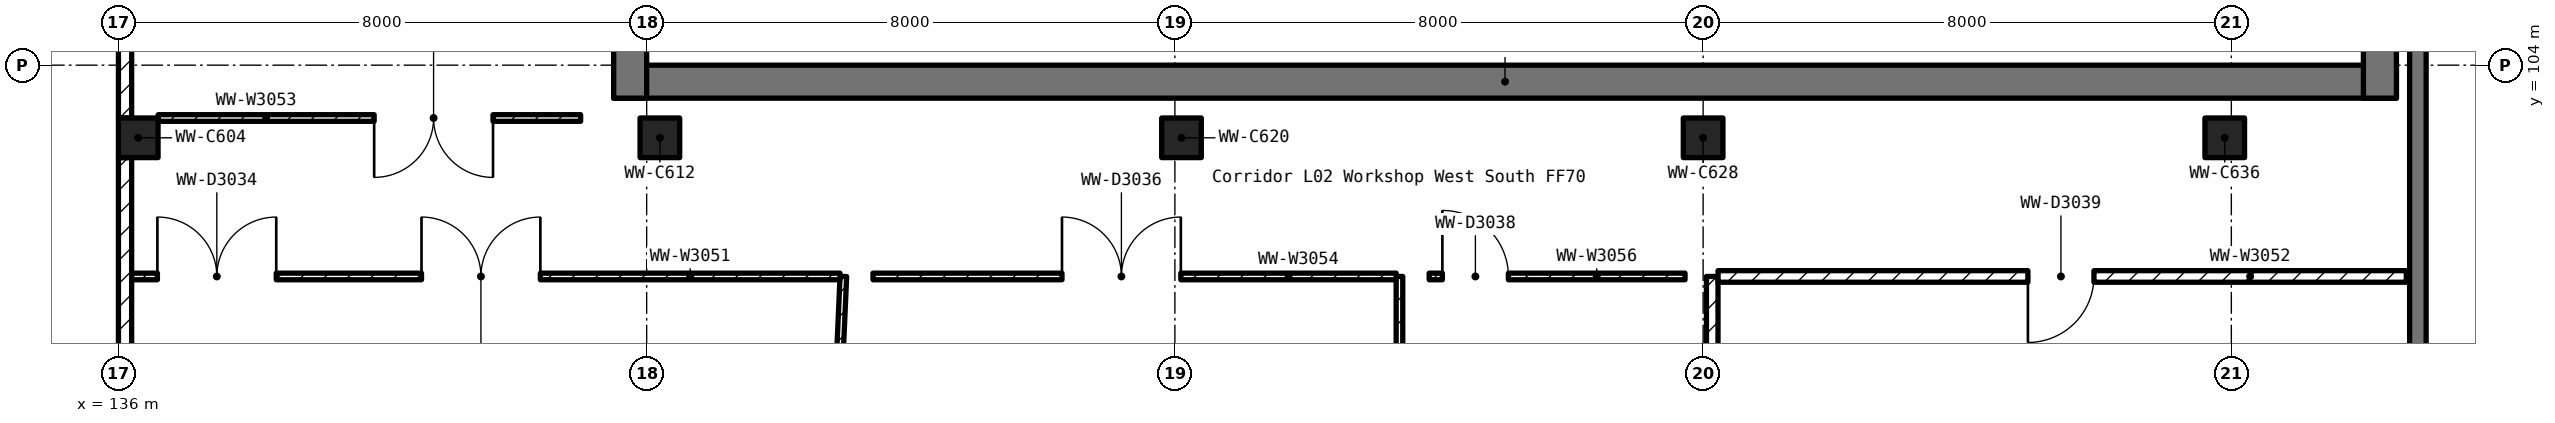
"""IFC4 building model, lengths in metres.
Left out: names, types, materials, properties, quantities, classifications, styles, units other than length and angle.
Written with IfcOpenShell. Run it as: python <this file> out.ifc"""

import sys

from ifc_helpers import new_model, si_unit, direction, frame, frame_2d, origin, origin_2d, place, context, subcontext, project, spatial, rectangle, extrude, element, fill, save


model = new_model("IFC4")
c1 = context("Model", 3, precision=1e-05, world=origin(), true_north=direction((0.0, 1.0)))
c2 = subcontext(c1, "Body", "Model", "MODEL_VIEW")
j1 = project(units=[si_unit("LENGTHUNIT", "METRE"), si_unit("PLANEANGLEUNIT", "RADIAN")], contexts=[c1])
p1 = place(None, origin())
s1 = spatial("IfcSite", under=j1, at=p1, CompositionType="ELEMENT")
p2 = place(p1, origin())
s2 = spatial("IfcBuilding", under=s1, at=p2, CompositionType="ELEMENT")
p3 = place(p2, frame((0.0, 0.0, 11.5)))
s3 = spatial("IfcBuildingStorey", under=s2, at=p3, CompositionType="ELEMENT", Elevation=11.5)
for number, where, z_axis, x_axis in (
    (1, (136.3, 102.9, 0.0), (0.0, 0.0, 1.0), (1.0, 0.0, 0.0)),
    (2, (144.2, 102.9, 0.0), (0.0, 0.0, 1.0), (1.0, 0.0, 0.0)),
    (3, (152.1, 102.9, 0.0), (0.0, 0.0, 1.0), (1.0, 0.0, 0.0)),
    (4, (160.0, 102.9, 0.0), (0.0, 0.0, 1.0), (1.0, 0.0, 0.0)),
    (5, (167.9, 102.9, 0.0), (0.0, 0.0, 1.0), (1.0, 0.0, 0.0)),
):
    element("IfcColumn", number, at=place(p3, frame(where, z_axis=z_axis, x_axis=x_axis)), inside=s3, PredefinedType="COLUMN", context=c2, shape_type="SweptSolid", body=[
        extrude(rectangle(XDim=0.6, YDim=0.6, at=origin_2d()), origin(), (0.0, 0.0, 1.0), 5.5),
    ])
p4 = place(p3, frame((143.5, 103.75, 0.0), z_axis=(0.0, 0.0, 1.0), x_axis=(1.0, 0.0, 0.0)))
e6 = element("IfcWall", 6, at=p4, inside=s3, PredefinedType="SHEAR", context=c2, shape_type="SweptSolid", body=[
    extrude(rectangle(XDim=27.0, YDim=0.5, at=frame_2d((13.5, 0.0))), origin(), (0.0, 0.0, 1.0), 5.5),
])
for number, where, z_axis, x_axis in (
    (7, (143.75, 103.5, 0.0), (0.0, 0.0, 1.0), (0.0, 1.0, 0.0)),
    (8, (170.25, 103.5, 0.0), (0.0, 0.0, 1.0), (0.0, 1.0, 0.0)),
):
    element("IfcWall", number, at=place(p3, frame(where, z_axis=z_axis, x_axis=x_axis)), inside=s3, PredefinedType="SHEAR", context=c2, shape_type="SweptSolid", body=[
        extrude(rectangle(XDim=25.0, YDim=0.5, at=frame_2d((12.5, 0.0))), origin(), (0.0, 0.0, 1.0), 5.5),
    ])
p5 = place(p3, frame((136.1, 106.9, 0.0), z_axis=(0.0, 0.0, 1.0), x_axis=(0.0, -1.0, 0.0)))
e9 = element("IfcWall", 9, at=p5, inside=s3, PredefinedType="SOLIDWALL", context=c2, shape_type="SweptSolid", body=[
    extrude(rectangle(XDim=3.7, YDim=0.2, at=frame_2d((1.85, 0.0))), origin(), (0.0, 0.0, 1.0), 4.45),
])
p6 = place(p3, frame((136.1, 102.6, 0.0), z_axis=(0.0, 0.0, 1.0), x_axis=(0.0, -1.0, 0.0)))
e10 = element("IfcWall", 10, at=p6, inside=s3, PredefinedType="SOLIDWALL", context=c2, shape_type="SweptSolid", body=[
    extrude(rectangle(XDim=2.925, YDim=0.2, at=frame_2d((1.462, 0.0))), origin(), (0.0, 0.0, 1.0), 4.45),
])
p7 = place(p3, frame((170.825, 105.6, 0.0), z_axis=(0.0, 0.0, 1.0), x_axis=(0.0, -1.0, 0.0)))
e11 = element("IfcWall", 11, at=p7, inside=s3, PredefinedType="SOLIDWALL", context=c2, shape_type="SweptSolid", body=[
    extrude(rectangle(XDim=6.6, YDim=0.25, at=frame_2d((3.3, 0.0))), origin(), (0.0, 0.0, 1.0), 5.5),
])
p8 = place(p3, frame((146.979, 100.8, 0.0), z_axis=(0.0, 0.0, 1.0), x_axis=(-0.044161260763, -0.999024415642, 0.0)))
e12 = element("IfcWall", 12, at=p8, inside=s3, PredefinedType="PARTITIONING", context=c2, shape_type="SweptSolid", body=[
    extrude(rectangle(XDim=22.622, YDim=0.1, at=frame_2d((11.311, 0.0))), origin(), (0.0, 0.0, 1.0), 4.45),
])
p9 = place(p3, frame((155.401, 100.8, 0.0), z_axis=(0.0, 0.0, 1.0), x_axis=(0.0, -1.0, 0.0)))
e13 = element("IfcWall", 13, at=p9, inside=s3, PredefinedType="PARTITIONING", context=c2, shape_type="SweptSolid", body=[
    extrude(rectangle(XDim=22.6, YDim=0.1, at=frame_2d((11.3, 0.0))), origin(), (0.0, 0.0, 1.0), 4.45),
])
p10 = place(p3, frame((160.138, 100.8, 0.0), z_axis=(0.0, 0.0, 1.0), x_axis=(0.0, -1.0, 0.0)))
e14 = element("IfcWall", 14, at=p10, inside=s3, PredefinedType="PARTITIONING", context=c2, shape_type="SweptSolid", body=[
    extrude(rectangle(XDim=5.799, YDim=0.175, at=frame_2d((2.899, 0.0))), origin(), (0.0, 0.0, 1.0), 4.45),
])
p11 = place(p3, frame((136.2, 100.8, 0.0), z_axis=(0.0, 0.0, 1.0), x_axis=(1.0, 0.0, 0.0)))
e15 = element("IfcWall", 15, at=p11, inside=s3, PredefinedType="PARTITIONING", context=c2, shape_type="SweptSolid", body=[
    extrude(rectangle(XDim=10.728, YDim=0.1, at=frame_2d((5.364, 0.0))), origin(), (0.0, 0.0, 1.0), 4.45),
])
p12 = place(p11, frame((4.39, 0.0, 0.0)))
e16 = element("IfcOpeningElement", 16, at=p12, cuts=e15, PredefinedType="OPENING", context=c2, shape_type="SweptSolid", body=[
    extrude(rectangle(XDim=1.8, YDim=2.1, at=frame_2d((0.9, 1.05))), frame((0.0, 0.062, 0.0), z_axis=(0.0, -1.0, 0.0), x_axis=(1.0, 0.0, 0.0)), (0.0, 0.0, 1.0), 0.124),
])
p13 = place(p11, frame((0.39, 0.0, 0.0)))
e17 = element("IfcOpeningElement", 17, at=p13, cuts=e15, PredefinedType="OPENING", context=c2, shape_type="SweptSolid", body=[
    extrude(rectangle(XDim=1.8, YDim=2.1, at=frame_2d((0.9, 1.05))), frame((0.0, 0.062, 0.0), z_axis=(0.0, -1.0, 0.0), x_axis=(1.0, 0.0, 0.0)), (0.0, 0.0, 1.0), 0.124),
])
p14 = place(p3, frame((170.65, 100.8, 0.0), z_axis=(0.0, 0.0, 1.0), x_axis=(-1.0, 0.0, 0.0)))
e18 = element("IfcWall", 18, at=p14, inside=s3, PredefinedType="PARTITIONING", context=c2, shape_type="SweptSolid", body=[
    extrude(rectangle(XDim=10.424, YDim=0.175, at=frame_2d((5.212, 0.0))), origin(), (0.0, 0.0, 1.0), 4.45),
])
p15 = place(p14, frame((4.731, 0.0, 0.0)))
e19 = element("IfcOpeningElement", 19, at=p15, cuts=e18, PredefinedType="OPENING", context=c2, shape_type="SweptSolid", body=[
    extrude(rectangle(XDim=1.0, YDim=2.1, at=frame_2d((0.5, 1.05))), frame((0.0, 0.1, 0.0), z_axis=(0.0, -1.0, 0.0), x_axis=(1.0, 0.0, 0.0)), (0.0, 0.0, 1.0), 0.199),
])
p16 = place(p3, frame((143.0, 103.2, 0.0), z_axis=(0.0, 0.0, 1.0), x_axis=(-1.0, 0.0, 0.0)))
e20 = element("IfcWall", 20, at=p16, inside=s3, PredefinedType="PARTITIONING", context=c2, shape_type="SweptSolid", body=[
    extrude(rectangle(XDim=6.399, YDim=0.1, at=frame_2d((3.199, 0.0))), origin(), (0.0, 0.0, 1.0), 4.35),
])
p17 = place(p16, frame((1.327, 0.0, 0.0)))
e21 = element("IfcOpeningElement", 21, at=p17, cuts=e20, PredefinedType="OPENING", context=c2, shape_type="SweptSolid", body=[
    extrude(rectangle(XDim=1.8, YDim=2.1, at=frame_2d((0.9, 1.05))), frame((0.0, 0.062, 0.0), z_axis=(0.0, -1.0, 0.0), x_axis=(1.0, 0.0, 0.0)), (0.0, 0.0, 1.0), 0.124),
])
p18 = place(p3, frame((147.428, 100.8, 0.0), z_axis=(0.0, 0.0, 1.0), x_axis=(1.0, 0.0, 0.0)))
e22 = element("IfcWall", 22, at=p18, inside=s3, PredefinedType="PARTITIONING", context=c2, shape_type="SweptSolid", body=[
    extrude(rectangle(XDim=7.923, YDim=0.1, at=frame_2d((3.961, 0.0))), origin(), (0.0, 0.0, 1.0), 4.45),
])
p19 = place(p18, frame((2.862, 0.0, 0.0)))
e23 = element("IfcOpeningElement", 23, at=p19, cuts=e22, PredefinedType="OPENING", context=c2, shape_type="SweptSolid", body=[
    extrude(rectangle(XDim=1.8, YDim=2.1, at=frame_2d((0.9, 1.05))), frame((0.0, 0.062, 0.0), z_axis=(0.0, -1.0, 0.0), x_axis=(1.0, 0.0, 0.0)), (0.0, 0.0, 1.0), 0.124),
])
p20 = place(p3, frame((155.851, 100.8, 0.0), z_axis=(0.0, 0.0, 1.0), x_axis=(1.0, 0.0, 0.0)))
e24 = element("IfcWall", 24, at=p20, inside=s3, PredefinedType="PARTITIONING", context=c2, shape_type="SweptSolid", body=[
    extrude(rectangle(XDim=3.875, YDim=0.1, at=frame_2d((1.938, 0.0))), origin(), (0.0, 0.0, 1.0), 4.45),
])
p21 = place(p20, frame((0.2, 0.0, 0.0)))
e25 = element("IfcOpeningElement", 25, at=p21, cuts=e24, PredefinedType="OPENING", context=c2, shape_type="SweptSolid", body=[
    extrude(rectangle(XDim=1.0, YDim=2.1, at=frame_2d((0.5, 1.05))), frame((0.0, 0.062, 0.0), z_axis=(0.0, -1.0, 0.0), x_axis=(1.0, 0.0, 0.0)), (0.0, 0.0, 1.0), 0.124),
])
p22 = place(p12, origin())
e26 = element("IfcDoor", 26, at=p22, inside=s3, OperationType="DOUBLE_DOOR_SINGLE_SWING", PredefinedType="DOOR", context=c2, shape_type="SweptSolid", body=[
    extrude(rectangle(XDim=1.8, YDim=2.1, at=frame_2d((0.9, 1.05))), frame((0.0, 0.025, 0.0), z_axis=(0.0, -1.0, 0.0), x_axis=(1.0, 0.0, 0.0)), (0.0, 0.0, 1.0), 0.05),
])
fill(e16, e26)
p23 = place(p13, origin())
e27 = element("IfcDoor", 27, at=p23, inside=s3, OperationType="DOUBLE_DOOR_SINGLE_SWING", PredefinedType="DOOR", context=c2, shape_type="SweptSolid", body=[
    extrude(rectangle(XDim=1.8, YDim=2.1, at=frame_2d((0.9, 1.05))), frame((0.0, 0.025, 0.0), z_axis=(0.0, -1.0, 0.0), x_axis=(1.0, 0.0, 0.0)), (0.0, 0.0, 1.0), 0.05),
])
fill(e17, e27)
p24 = place(p17, origin())
e28 = element("IfcDoor", 28, at=p24, inside=s3, OperationType="DOUBLE_DOOR_SINGLE_SWING", PredefinedType="DOOR", context=c2, shape_type="SweptSolid", body=[
    extrude(rectangle(XDim=1.8, YDim=2.1, at=frame_2d((0.9, 1.05))), frame((0.0, 0.025, 0.0), z_axis=(0.0, -1.0, 0.0), x_axis=(1.0, 0.0, 0.0)), (0.0, 0.0, 1.0), 0.05),
])
fill(e21, e28)
p25 = place(p19, origin())
e29 = element("IfcDoor", 29, at=p25, inside=s3, OperationType="DOUBLE_DOOR_SINGLE_SWING", PredefinedType="DOOR", context=c2, shape_type="SweptSolid", body=[
    extrude(rectangle(XDim=1.8, YDim=2.1, at=frame_2d((0.9, 1.05))), frame((0.0, 0.025, 0.0), z_axis=(0.0, -1.0, 0.0), x_axis=(1.0, 0.0, 0.0)), (0.0, 0.0, 1.0), 0.05),
])
fill(e23, e29)
p26 = place(p21, origin())
e30 = element("IfcDoor", 30, at=p26, inside=s3, OperationType="SINGLE_SWING_LEFT", PredefinedType="DOOR", context=c2, shape_type="SweptSolid", body=[
    extrude(rectangle(XDim=1.0, YDim=2.1, at=frame_2d((0.5, 1.05))), frame((0.0, 0.025, 0.0), z_axis=(0.0, -1.0, 0.0), x_axis=(1.0, 0.0, 0.0)), (0.0, 0.0, 1.0), 0.05),
])
fill(e25, e30)
p27 = place(p15, origin())
e31 = element("IfcDoor", 31, at=p27, inside=s3, OperationType="SINGLE_SWING_RIGHT", PredefinedType="DOOR", context=c2, shape_type="SweptSolid", body=[
    extrude(rectangle(XDim=1.0, YDim=2.1, at=frame_2d((0.5, 1.05))), frame((0.0, 0.025, 0.0), z_axis=(0.0, -1.0, 0.0), x_axis=(1.0, 0.0, 0.0)), (0.0, 0.0, 1.0), 0.05),
])
fill(e19, e31)
save(model, sys.argv[1])
